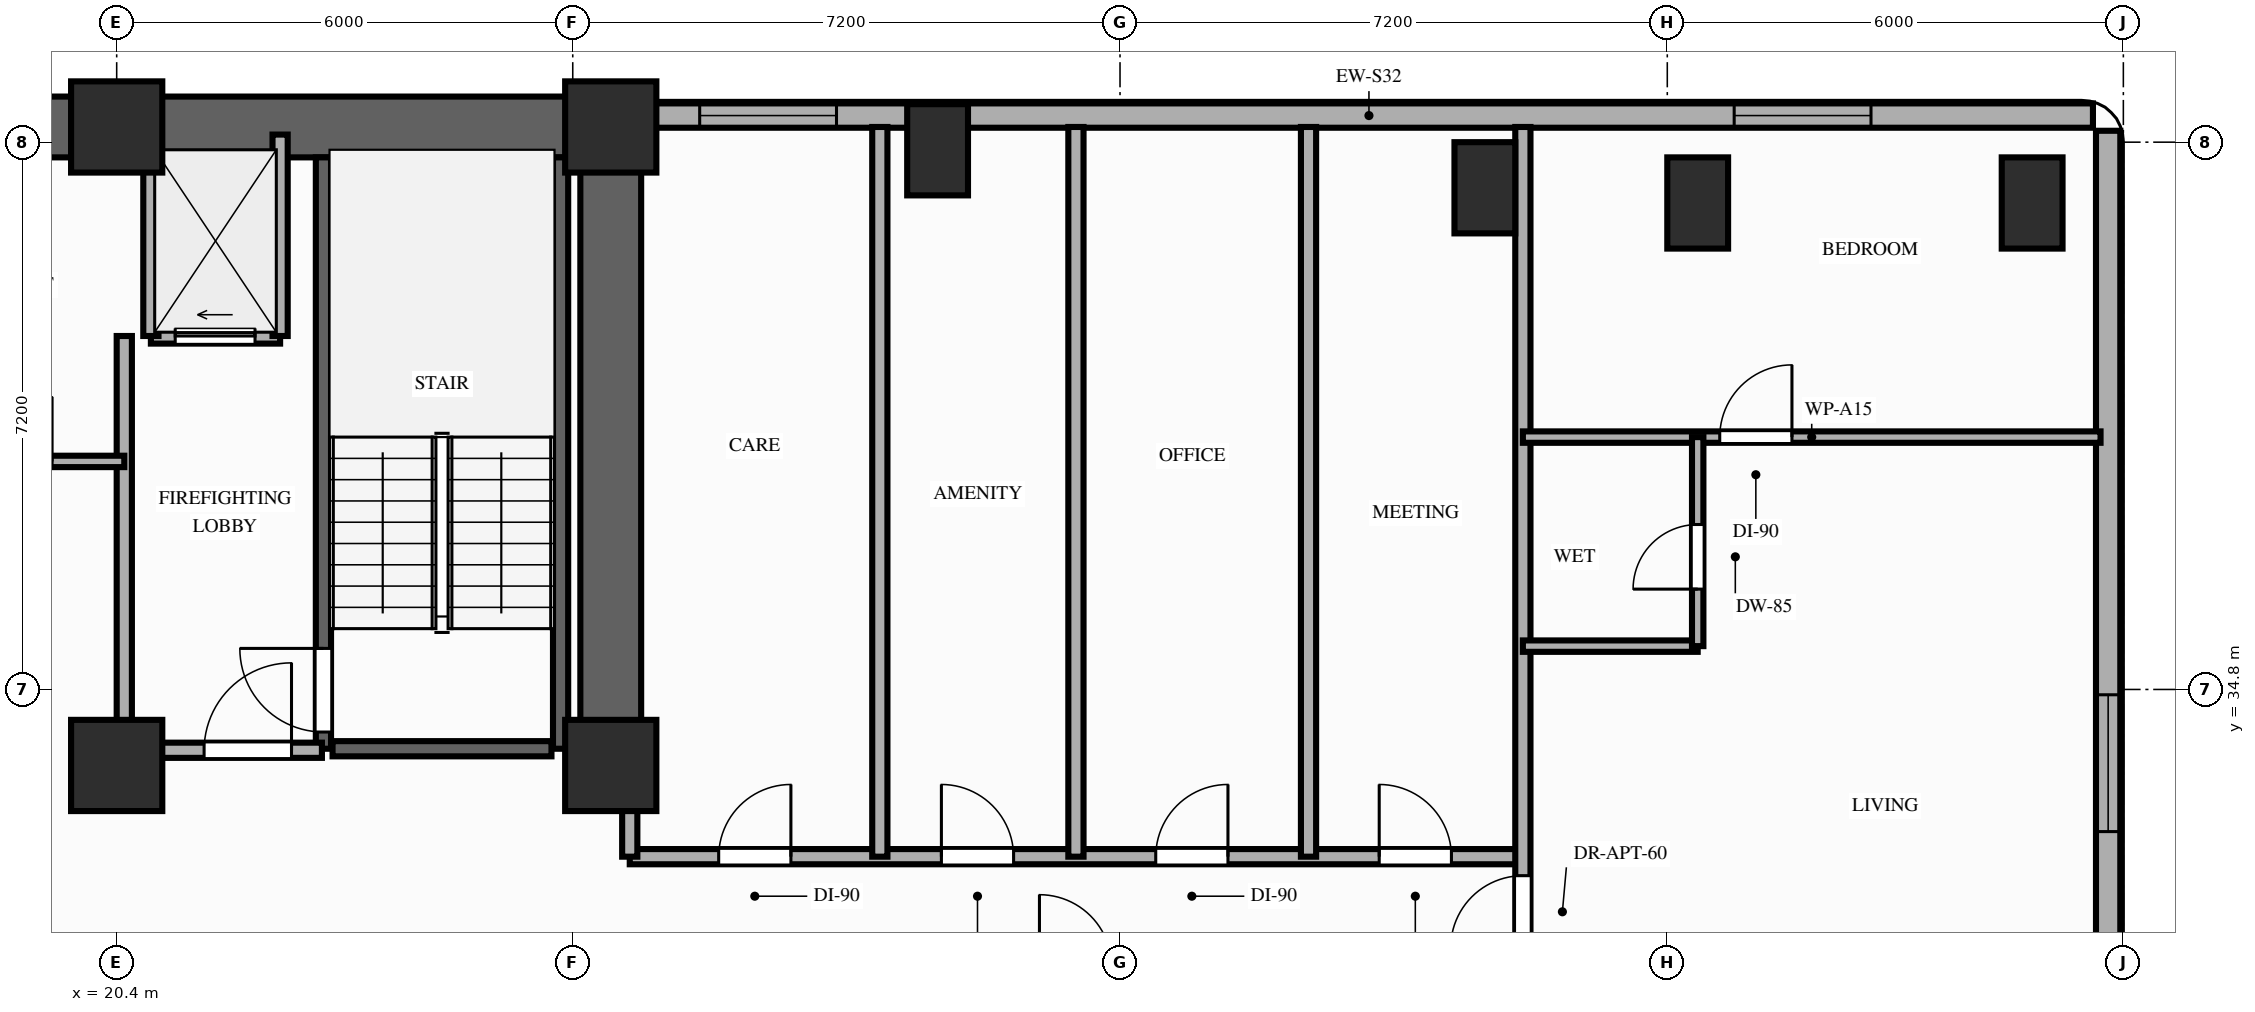
"""IFC4 building model, lengths in metres.
Left out: names, types, materials, properties, quantities, classifications, styles, units other than length and angle.
Written with IfcOpenShell. Run it as: python <this file> out.ifc"""

import sys

from ifc_helpers import new_model, si_unit, direction, frame, frame_2d, origin, origin_2d, place, context, subcontext, project, spatial, rectangle, extrude, element, fill, save


model = new_model("IFC4")
c1 = context("Model", 3, precision=1e-05, world=origin(), true_north=direction((0.0, 1.0)))
c2 = subcontext(c1, "Body", "Model", "MODEL_VIEW")
j1 = project(units=[si_unit("LENGTHUNIT", "METRE"), si_unit("PLANEANGLEUNIT", "RADIAN")], contexts=[c1])
p1 = place(None, origin())
s1 = spatial("IfcSite", under=j1, at=p1, CompositionType="ELEMENT")
p2 = place(p1, origin())
s2 = spatial("IfcBuilding", under=s1, at=p2, CompositionType="ELEMENT")
p3 = place(p2, frame((0.0, 0.0, 93.0)))
s3 = spatial("IfcBuildingStorey", under=s2, at=p3, CompositionType="ELEMENT", Elevation=93.0)
for number, where, z_axis, x_axis in (
    (1, (20.4, 33.8, 0.0), (0.0, 0.0, 1.0), (1.0, 0.0, 0.0)),
    (2, (26.9, 33.8, 0.0), (0.0, 0.0, 1.0), (1.0, 0.0, 0.0)),
    (3, (20.4, 42.2, 0.0), (0.0, 0.0, 1.0), (1.0, 0.0, 0.0)),
    (4, (26.9, 42.2, 0.0), (0.0, 0.0, 1.0), (1.0, 0.0, 0.0)),
):
    element("IfcColumn", number, at=place(p3, frame(where, z_axis=z_axis, x_axis=x_axis)), inside=s3, PredefinedType="COLUMN", context=c2, shape_type="SweptSolid", body=[
        extrude(rectangle(XDim=1.2, YDim=1.2, at=origin_2d()), origin(), (0.0, 0.0, 1.0), 3.2),
    ])
for number, where, z_axis, x_axis in (
    (5, (31.2, 41.9, 0.0), (0.0, 0.0, 1.0), (1.0, 0.0, 0.0)),
    (6, (38.4, 41.4, 0.0), (0.0, 0.0, 1.0), (1.0, 0.0, 0.0)),
    (7, (41.2, 41.2, 0.0), (0.0, 0.0, 1.0), (1.0, 0.0, 0.0)),
    (8, (45.6, 41.2, 0.0), (0.0, 0.0, 1.0), (1.0, 0.0, 0.0)),
):
    element("IfcColumn", number, at=place(p3, frame(where, z_axis=z_axis, x_axis=x_axis)), inside=s3, PredefinedType="COLUMN", context=c2, shape_type="SweptSolid", body=[
        extrude(rectangle(XDim=0.8, YDim=1.2, at=origin_2d()), origin(), (0.0, 0.0, 1.0), 3.2),
    ])
p4 = place(p3, frame((46.4, 42.35, 0.0), z_axis=(0.0, 0.0, 1.0), x_axis=(-1.0, 0.0, 0.0)))
e9 = element("IfcWall", 9, at=p4, inside=s3, PredefinedType="STANDARD", context=c2, shape_type="SweptSolid", body=[
    extrude(rectangle(XDim=19.05, YDim=0.32, at=frame_2d((9.525, 0.0))), origin(), (0.0, 0.0, 1.0), 2.41),
])
p5 = place(p4, frame((2.92, 0.0, 0.85)))
e10 = element("IfcOpeningElement", 10, at=p5, cuts=e9, PredefinedType="OPENING", context=c2, shape_type="SweptSolid", body=[
    extrude(rectangle(XDim=1.8, YDim=1.31, at=frame_2d((0.9, 0.655))), frame((0.0, 0.17, 0.0), z_axis=(0.0, -1.0, 0.0), x_axis=(1.0, 0.0, 0.0)), (0.0, 0.0, 1.0), 0.34),
])
p6 = place(p4, frame((16.53, 0.0, 0.85)))
e11 = element("IfcOpeningElement", 11, at=p6, cuts=e9, PredefinedType="OPENING", context=c2, shape_type="SweptSolid", body=[
    extrude(rectangle(XDim=1.8, YDim=1.31, at=frame_2d((0.9, 0.655))), frame((0.0, 0.17, 0.0), z_axis=(0.0, -1.0, 0.0), x_axis=(1.0, 0.0, 0.0)), (0.0, 0.0, 1.0), 0.34),
])
p7 = place(p3, frame((46.6, 26.8, 0.0), z_axis=(0.0, 0.0, 1.0), x_axis=(0.0, 1.0, 0.0)))
e12 = element("IfcWall", 12, at=p7, inside=s3, PredefinedType="STANDARD", context=c2, shape_type="SweptSolid", body=[
    extrude(rectangle(XDim=15.35, YDim=0.32, at=frame_2d((7.675, 0.0))), origin(), (0.0, 0.0, 1.0), 3.02),
])
p8 = place(p7, frame((6.13, 0.0, 0.85)))
e13 = element("IfcOpeningElement", 13, at=p8, cuts=e12, PredefinedType="OPENING", context=c2, shape_type="SweptSolid", body=[
    extrude(rectangle(XDim=1.8, YDim=1.75, at=frame_2d((0.9, 0.875))), frame((0.0, 0.17, 0.0), z_axis=(0.0, -1.0, 0.0), x_axis=(1.0, 0.0, 0.0)), (0.0, 0.0, 1.0), 0.34),
])
p9 = place(p3, frame((6.45, 42.2, 0.0), z_axis=(0.0, 0.0, 1.0), x_axis=(1.0, 0.0, 0.0)))
e14 = element("IfcWall", 14, at=p9, inside=s3, PredefinedType="SHEAR", context=c2, shape_type="SweptSolid", body=[
    extrude(rectangle(XDim=20.45, YDim=0.8, at=frame_2d((10.225, 0.0))), origin(), (0.0, 0.0, 1.0), 3.02),
])
p10 = place(p3, frame((26.9, 33.8, 0.0), z_axis=(0.0, 0.0, 1.0), x_axis=(0.0, 1.0, 0.0)))
e15 = element("IfcWall", 15, at=p10, inside=s3, PredefinedType="SHEAR", context=c2, shape_type="SweptSolid", body=[
    extrude(rectangle(XDim=7.95, YDim=0.8, at=frame_2d((3.975, 0.0))), origin(), (0.0, 0.0, 1.0), 3.02),
])
p11 = place(p3, frame((23.12, 34.02, 0.0), z_axis=(0.0, 0.0, 1.0), x_axis=(0.0, 1.0, 0.0)))
e16 = element("IfcWall", 16, at=p11, inside=s3, PredefinedType="SHEAR", context=c2, shape_type="SweptSolid", body=[
    extrude(rectangle(XDim=7.78, YDim=0.2, at=frame_2d((3.89, 0.0))), origin(), (0.0, 0.0, 1.0), 3.02),
])
p12 = place(p11, frame((0.22, 0.0, 0.0)))
e17 = element("IfcOpeningElement", 17, at=p12, cuts=e16, PredefinedType="OPENING", context=c2, shape_type="SweptSolid", body=[
    extrude(rectangle(XDim=1.1, YDim=2.15, at=frame_2d((0.55, 1.075))), frame((0.0, 0.11, 0.0), z_axis=(0.0, -1.0, 0.0), x_axis=(1.0, 0.0, 0.0)), (0.0, 0.0, 1.0), 0.22),
])
p13 = place(p3, frame((26.24, 34.02, 0.0), z_axis=(0.0, 0.0, 1.0), x_axis=(0.0, 1.0, 0.0)))
e18 = element("IfcWall", 18, at=p13, inside=s3, PredefinedType="SHEAR", context=c2, shape_type="SweptSolid", body=[
    extrude(rectangle(XDim=7.78, YDim=0.2, at=frame_2d((3.89, 0.0))), origin(), (0.0, 0.0, 1.0), 3.02),
])
p14 = place(p3, frame((23.24, 34.02, 0.0), z_axis=(0.0, 0.0, 1.0), x_axis=(1.0, 0.0, 0.0)))
e19 = element("IfcWall", 19, at=p14, inside=s3, PredefinedType="SHEAR", context=c2, shape_type="SweptSolid", body=[
    extrude(rectangle(XDim=2.88, YDim=0.2, at=frame_2d((1.44, 0.0))), origin(), (0.0, 0.0, 1.0), 3.02),
])
p15 = place(p3, frame((20.85, 39.45, 0.0), z_axis=(0.0, 0.0, 1.0), x_axis=(1.0, 0.0, 0.0)))
e20 = element("IfcWall", 20, at=p15, inside=s3, PredefinedType="MOVABLE", context=c2, shape_type="SweptSolid", body=[
    extrude(rectangle(XDim=1.7, YDim=0.2, at=frame_2d((0.85, 0.0))), origin(), (0.0, 0.0, 1.0), 3.02),
])
p16 = place(p15, frame((0.32, 0.0, 0.0)))
e21 = element("IfcOpeningElement", 21, at=p16, cuts=e20, PredefinedType="OPENING", context=c2, shape_type="SweptSolid", body=[
    extrude(rectangle(XDim=1.05, YDim=2.15, at=frame_2d((0.525, 1.075))), frame((0.0, 0.11, 0.0), z_axis=(0.0, -1.0, 0.0), x_axis=(1.0, 0.0, 0.0)), (0.0, 0.0, 1.0), 0.22),
])
for number, where, z_axis, x_axis in (
    (22, (20.85, 39.45, 0.0), (0.0, 0.0, 1.0), (0.0, 1.0, 0.0)),
    (23, (22.55, 39.45, 0.0), (0.0, 0.0, 1.0), (0.0, 1.0, 0.0)),
):
    element("IfcWall", number, at=place(p3, frame(where, z_axis=z_axis, x_axis=x_axis)), inside=s3, PredefinedType="MOVABLE", context=c2, shape_type="SweptSolid", body=[
        extrude(rectangle(XDim=2.65, YDim=0.2, at=frame_2d((1.325, 0.0))), origin(), (0.0, 0.0, 1.0), 2.41),
    ])
p17 = place(p3, frame((20.5, 34.0, 0.0), z_axis=(0.0, 0.0, 1.0), x_axis=(0.0, 1.0, 0.0)))
e24 = element("IfcWall", 24, at=p17, inside=s3, PredefinedType="PARTITIONING", context=c2, shape_type="SweptSolid", body=[
    extrude(rectangle(XDim=5.45, YDim=0.2, at=frame_2d((2.725, 0.0))), origin(), (0.0, 0.0, 1.0), 2.41),
])
p18 = place(p3, frame((20.5, 34.0, 0.0), z_axis=(0.0, 0.0, 1.0), x_axis=(1.0, 0.0, 0.0)))
e25 = element("IfcWall", 25, at=p18, inside=s3, PredefinedType="PARTITIONING", context=c2, shape_type="SweptSolid", body=[
    extrude(rectangle(XDim=2.6, YDim=0.2, at=frame_2d((1.3, 0.0))), origin(), (0.0, 0.0, 1.0), 2.41),
])
p19 = place(p18, frame((1.05, 0.0, 0.0)))
e26 = element("IfcOpeningElement", 26, at=p19, cuts=e25, PredefinedType="OPENING", context=c2, shape_type="SweptSolid", body=[
    extrude(rectangle(XDim=1.15, YDim=2.15, at=frame_2d((0.575, 1.075))), frame((0.0, 0.11, 0.0), z_axis=(0.0, -1.0, 0.0), x_axis=(1.0, 0.0, 0.0)), (0.0, 0.0, 1.0), 0.22),
])
p20 = place(p3, frame((12.9, 37.8, 0.0), z_axis=(0.0, 0.0, 1.0), x_axis=(1.0, 0.0, 0.0)))
e27 = element("IfcWall", 27, at=p20, inside=s3, PredefinedType="PARTITIONING", context=c2, shape_type="SweptSolid", body=[
    extrude(rectangle(XDim=7.6, YDim=0.15, at=frame_2d((3.8, 0.0))), origin(), (0.0, 0.0, 1.0), 3.02),
])
p21 = place(p20, frame((0.7, 0.0, 0.0)))
e28 = element("IfcOpeningElement", 28, at=p21, cuts=e27, PredefinedType="OPENING", context=c2, shape_type="SweptSolid", body=[
    extrude(rectangle(XDim=0.85, YDim=2.05, at=frame_2d((0.425, 1.025))), frame((0.0, 0.085, 0.0), z_axis=(0.0, -1.0, 0.0), x_axis=(1.0, 0.0, 0.0)), (0.0, 0.0, 1.0), 0.17),
])
p22 = place(p20, frame((3.25, 0.0, 0.0)))
e29 = element("IfcOpeningElement", 29, at=p22, cuts=e27, PredefinedType="OPENING", context=c2, shape_type="SweptSolid", body=[
    extrude(rectangle(XDim=0.85, YDim=2.05, at=frame_2d((0.425, 1.025))), frame((0.0, 0.085, 0.0), z_axis=(0.0, -1.0, 0.0), x_axis=(1.0, 0.0, 0.0)), (0.0, 0.0, 1.0), 0.17),
])
p23 = place(p20, frame((5.8, 0.0, 0.0)))
e30 = element("IfcOpeningElement", 30, at=p23, cuts=e27, PredefinedType="OPENING", context=c2, shape_type="SweptSolid", body=[
    extrude(rectangle(XDim=0.85, YDim=2.05, at=frame_2d((0.425, 1.025))), frame((0.0, 0.085, 0.0), z_axis=(0.0, -1.0, 0.0), x_axis=(1.0, 0.0, 0.0)), (0.0, 0.0, 1.0), 0.17),
])
p24 = place(p3, frame((27.15, 32.6, 0.0), z_axis=(0.0, 0.0, 1.0), x_axis=(1.0, 0.0, 0.0)))
e31 = element("IfcWall", 31, at=p24, inside=s3, PredefinedType="PARTITIONING", context=c2, shape_type="SweptSolid", body=[
    extrude(rectangle(XDim=11.75, YDim=0.2, at=frame_2d((5.875, 0.0))), origin(), (0.0, 0.0, 1.0), 2.41),
])
p25 = place(p24, frame((1.17, 0.0, 0.0)))
e32 = element("IfcOpeningElement", 32, at=p25, cuts=e31, PredefinedType="OPENING", context=c2, shape_type="SweptSolid", body=[
    extrude(rectangle(XDim=0.95, YDim=2.15, at=frame_2d((0.475, 1.075))), frame((0.0, 0.11, 0.0), z_axis=(0.0, -1.0, 0.0), x_axis=(1.0, 0.0, 0.0)), (0.0, 0.0, 1.0), 0.22),
])
p26 = place(p24, frame((4.1, 0.0, 0.0)))
e33 = element("IfcOpeningElement", 33, at=p26, cuts=e31, PredefinedType="OPENING", context=c2, shape_type="SweptSolid", body=[
    extrude(rectangle(XDim=0.95, YDim=2.15, at=frame_2d((0.475, 1.075))), frame((0.0, 0.11, 0.0), z_axis=(0.0, -1.0, 0.0), x_axis=(1.0, 0.0, 0.0)), (0.0, 0.0, 1.0), 0.22),
])
p27 = place(p24, frame((6.92, 0.0, 0.0)))
e34 = element("IfcOpeningElement", 34, at=p27, cuts=e31, PredefinedType="OPENING", context=c2, shape_type="SweptSolid", body=[
    extrude(rectangle(XDim=0.95, YDim=2.15, at=frame_2d((0.475, 1.075))), frame((0.0, 0.11, 0.0), z_axis=(0.0, -1.0, 0.0), x_axis=(1.0, 0.0, 0.0)), (0.0, 0.0, 1.0), 0.22),
])
p28 = place(p24, frame((9.86, 0.0, 0.0)))
e35 = element("IfcOpeningElement", 35, at=p28, cuts=e31, PredefinedType="OPENING", context=c2, shape_type="SweptSolid", body=[
    extrude(rectangle(XDim=0.95, YDim=2.15, at=frame_2d((0.475, 1.075))), frame((0.0, 0.11, 0.0), z_axis=(0.0, -1.0, 0.0), x_axis=(1.0, 0.0, 0.0)), (0.0, 0.0, 1.0), 0.22),
])
p29 = place(p3, frame((27.15, 32.6, 0.0), z_axis=(0.0, 0.0, 1.0), x_axis=(0.0, 1.0, 0.0)))
e36 = element("IfcWall", 36, at=p29, inside=s3, PredefinedType="PARTITIONING", context=c2, shape_type="SweptSolid", body=[
    extrude(rectangle(XDim=1.08, YDim=0.2, at=frame_2d((0.54, 0.0))), origin(), (0.0, 0.0, 1.0), 2.41),
])
p30 = place(p3, frame((38.9, 26.75, 0.0), z_axis=(0.0, 0.0, 1.0), x_axis=(0.0, 1.0, 0.0)))
e37 = element("IfcWall", 37, at=p30, inside=s3, PredefinedType="PARTITIONING", context=c2, shape_type="SweptSolid", body=[
    extrude(rectangle(XDim=15.45, YDim=0.2, at=frame_2d((7.725, 0.0))), origin(), (0.0, 0.0, 1.0), 2.41),
])
p31 = place(p30, frame((4.65, 0.0, 0.0)))
e38 = element("IfcOpeningElement", 38, at=p31, cuts=e37, PredefinedType="OPENING", context=c2, shape_type="SweptSolid", body=[
    extrude(rectangle(XDim=0.95, YDim=2.15, at=frame_2d((0.475, 1.075))), frame((0.0, 0.11, 0.0), z_axis=(0.0, -1.0, 0.0), x_axis=(1.0, 0.0, 0.0)), (0.0, 0.0, 1.0), 0.22),
])
p32 = place(p3, frame((38.9, 38.12, 0.0), z_axis=(0.0, 0.0, 1.0), x_axis=(1.0, 0.0, 0.0)))
e39 = element("IfcWall", 39, at=p32, inside=s3, PredefinedType="PARTITIONING", context=c2, shape_type="SweptSolid", body=[
    extrude(rectangle(XDim=7.6, YDim=0.15, at=frame_2d((3.8, 0.0))), origin(), (0.0, 0.0, 1.0), 2.41),
])
p33 = place(p32, frame((2.59, 0.0, 0.0)))
e40 = element("IfcOpeningElement", 40, at=p33, cuts=e39, PredefinedType="OPENING", context=c2, shape_type="SweptSolid", body=[
    extrude(rectangle(XDim=0.95, YDim=2.15, at=frame_2d((0.475, 1.075))), frame((0.0, 0.085, 0.0), z_axis=(0.0, -1.0, 0.0), x_axis=(1.0, 0.0, 0.0)), (0.0, 0.0, 1.0), 0.17),
])
p34 = place(p3, frame((38.9, 35.37, 0.0), z_axis=(0.0, 0.0, 1.0), x_axis=(1.0, 0.0, 0.0)))
e41 = element("IfcWall", 41, at=p34, inside=s3, PredefinedType="PARTITIONING", context=c2, shape_type="SweptSolid", body=[
    extrude(rectangle(XDim=2.3, YDim=0.15, at=frame_2d((1.15, 0.0))), origin(), (0.0, 0.0, 1.0), 2.41),
])
p35 = place(p3, frame((41.2, 35.37, 0.0), z_axis=(0.0, 0.0, 1.0), x_axis=(0.0, 1.0, 0.0)))
e42 = element("IfcWall", 42, at=p35, inside=s3, PredefinedType="PARTITIONING", context=c2, shape_type="SweptSolid", body=[
    extrude(rectangle(XDim=2.75, YDim=0.15, at=frame_2d((1.375, 0.0))), origin(), (0.0, 0.0, 1.0), 2.41),
])
p36 = place(p35, frame((0.75, 0.0, 0.0)))
e43 = element("IfcOpeningElement", 43, at=p36, cuts=e42, PredefinedType="OPENING", context=c2, shape_type="SweptSolid", body=[
    extrude(rectangle(XDim=0.85, YDim=2.1, at=frame_2d((0.425, 1.05))), frame((0.0, 0.085, 0.0), z_axis=(0.0, -1.0, 0.0), x_axis=(1.0, 0.0, 0.0)), (0.0, 0.0, 1.0), 0.17),
])
for number, where, z_axis, x_axis in (
    (44, (30.44, 32.6, 0.0), (0.0, 0.0, 1.0), (0.0, 1.0, 0.0)),
    (45, (33.02, 32.6, 0.0), (0.0, 0.0, 1.0), (0.0, 1.0, 0.0)),
    (46, (36.08, 32.6, 0.0), (0.0, 0.0, 1.0), (0.0, 1.0, 0.0)),
):
    element("IfcWall", number, at=place(p3, frame(where, z_axis=z_axis, x_axis=x_axis)), inside=s3, PredefinedType="PARTITIONING", context=c2, shape_type="SweptSolid", body=[
        extrude(rectangle(XDim=9.6, YDim=0.2, at=frame_2d((4.8, 0.0))), origin(), (0.0, 0.0, 1.0), 2.41),
    ])
p37 = place(p8, origin())
e47 = element("IfcWindow", 47, at=p37, inside=s3, PartitioningType="SINGLE_PANEL", PredefinedType="WINDOW", context=c2, shape_type="SweptSolid", body=[
    extrude(rectangle(XDim=1.8, YDim=1.75, at=frame_2d((0.9, 0.875))), frame((0.0, 0.03, 0.0), z_axis=(0.0, -1.0, 0.0), x_axis=(1.0, 0.0, 0.0)), (0.0, 0.0, 1.0), 0.06),
])
fill(e13, e47)
p38 = place(p5, origin())
e48 = element("IfcWindow", 48, at=p38, inside=s3, PartitioningType="SINGLE_PANEL", PredefinedType="WINDOW", context=c2, shape_type="SweptSolid", body=[
    extrude(rectangle(XDim=1.8, YDim=1.31, at=frame_2d((0.9, 0.655))), frame((0.0, 0.03, 0.0), z_axis=(0.0, -1.0, 0.0), x_axis=(1.0, 0.0, 0.0)), (0.0, 0.0, 1.0), 0.06),
])
fill(e10, e48)
p39 = place(p6, origin())
e49 = element("IfcWindow", 49, at=p39, inside=s3, PartitioningType="SINGLE_PANEL", PredefinedType="WINDOW", context=c2, shape_type="SweptSolid", body=[
    extrude(rectangle(XDim=1.8, YDim=1.31, at=frame_2d((0.9, 0.655))), frame((0.0, 0.03, 0.0), z_axis=(0.0, -1.0, 0.0), x_axis=(1.0, 0.0, 0.0)), (0.0, 0.0, 1.0), 0.06),
])
fill(e11, e49)
p40 = place(p12, origin())
e50 = element("IfcDoor", 50, at=p40, inside=s3, OperationType="SINGLE_SWING_RIGHT", PredefinedType="DOOR", context=c2, shape_type="SweptSolid", body=[
    extrude(rectangle(XDim=1.1, YDim=2.15, at=frame_2d((0.55, 1.075))), frame((0.0, 0.025, 0.0), z_axis=(0.0, -1.0, 0.0), x_axis=(1.0, 0.0, 0.0)), (0.0, 0.0, 1.0), 0.05),
])
fill(e17, e50)
p41 = place(p16, origin())
e51 = element("IfcDoor", 51, at=p41, inside=s3, OperationType="SLIDING_TO_LEFT", PredefinedType="DOOR", context=c2, shape_type="SweptSolid", body=[
    extrude(rectangle(XDim=1.05, YDim=2.15, at=frame_2d((0.525, 1.075))), frame((0.0, 0.025, 0.0), z_axis=(0.0, -1.0, 0.0), x_axis=(1.0, 0.0, 0.0)), (0.0, 0.0, 1.0), 0.05),
])
fill(e21, e51)
p42 = place(p19, origin())
e52 = element("IfcDoor", 52, at=p42, inside=s3, OperationType="SINGLE_SWING_RIGHT", PredefinedType="DOOR", context=c2, shape_type="SweptSolid", body=[
    extrude(rectangle(XDim=1.15, YDim=2.15, at=frame_2d((0.575, 1.075))), frame((0.0, 0.025, 0.0), z_axis=(0.0, -1.0, 0.0), x_axis=(1.0, 0.0, 0.0)), (0.0, 0.0, 1.0), 0.05),
])
fill(e26, e52)
p43 = place(p31, origin())
e53 = element("IfcDoor", 53, at=p43, inside=s3, OperationType="SINGLE_SWING_LEFT", PredefinedType="DOOR", context=c2, shape_type="SweptSolid", body=[
    extrude(rectangle(XDim=0.95, YDim=2.15, at=frame_2d((0.475, 1.075))), frame((0.0, 0.025, 0.0), z_axis=(0.0, -1.0, 0.0), x_axis=(1.0, 0.0, 0.0)), (0.0, 0.0, 1.0), 0.05),
])
fill(e38, e53)
p44 = place(p33, origin())
e54 = element("IfcDoor", 54, at=p44, inside=s3, OperationType="SINGLE_SWING_RIGHT", PredefinedType="DOOR", context=c2, shape_type="SweptSolid", body=[
    extrude(rectangle(XDim=0.95, YDim=2.15, at=frame_2d((0.475, 1.075))), frame((0.0, 0.025, 0.0), z_axis=(0.0, -1.0, 0.0), x_axis=(1.0, 0.0, 0.0)), (0.0, 0.0, 1.0), 0.05),
])
fill(e40, e54)
p45 = place(p36, origin())
e55 = element("IfcDoor", 55, at=p45, inside=s3, OperationType="SINGLE_SWING_LEFT", PredefinedType="DOOR", context=c2, shape_type="SweptSolid", body=[
    extrude(rectangle(XDim=0.85, YDim=2.1, at=frame_2d((0.425, 1.05))), frame((0.0, 0.025, 0.0), z_axis=(0.0, -1.0, 0.0), x_axis=(1.0, 0.0, 0.0)), (0.0, 0.0, 1.0), 0.05),
])
fill(e43, e55)
p46 = place(p25, origin())
e56 = element("IfcDoor", 56, at=p46, inside=s3, OperationType="SINGLE_SWING_RIGHT", PredefinedType="DOOR", context=c2, shape_type="SweptSolid", body=[
    extrude(rectangle(XDim=0.95, YDim=2.15, at=frame_2d((0.475, 1.075))), frame((0.0, 0.025, 0.0), z_axis=(0.0, -1.0, 0.0), x_axis=(1.0, 0.0, 0.0)), (0.0, 0.0, 1.0), 0.05),
])
fill(e32, e56)
p47 = place(p26, origin())
e57 = element("IfcDoor", 57, at=p47, inside=s3, OperationType="SINGLE_SWING_LEFT", PredefinedType="DOOR", context=c2, shape_type="SweptSolid", body=[
    extrude(rectangle(XDim=0.95, YDim=2.15, at=frame_2d((0.475, 1.075))), frame((0.0, 0.025, 0.0), z_axis=(0.0, -1.0, 0.0), x_axis=(1.0, 0.0, 0.0)), (0.0, 0.0, 1.0), 0.05),
])
fill(e33, e57)
p48 = place(p27, origin())
e58 = element("IfcDoor", 58, at=p48, inside=s3, OperationType="SINGLE_SWING_RIGHT", PredefinedType="DOOR", context=c2, shape_type="SweptSolid", body=[
    extrude(rectangle(XDim=0.95, YDim=2.15, at=frame_2d((0.475, 1.075))), frame((0.0, 0.025, 0.0), z_axis=(0.0, -1.0, 0.0), x_axis=(1.0, 0.0, 0.0)), (0.0, 0.0, 1.0), 0.05),
])
fill(e34, e58)
p49 = place(p28, origin())
e59 = element("IfcDoor", 59, at=p49, inside=s3, OperationType="SINGLE_SWING_LEFT", PredefinedType="DOOR", context=c2, shape_type="SweptSolid", body=[
    extrude(rectangle(XDim=0.95, YDim=2.15, at=frame_2d((0.475, 1.075))), frame((0.0, 0.025, 0.0), z_axis=(0.0, -1.0, 0.0), x_axis=(1.0, 0.0, 0.0)), (0.0, 0.0, 1.0), 0.05),
])
fill(e35, e59)
save(model, sys.argv[1])
